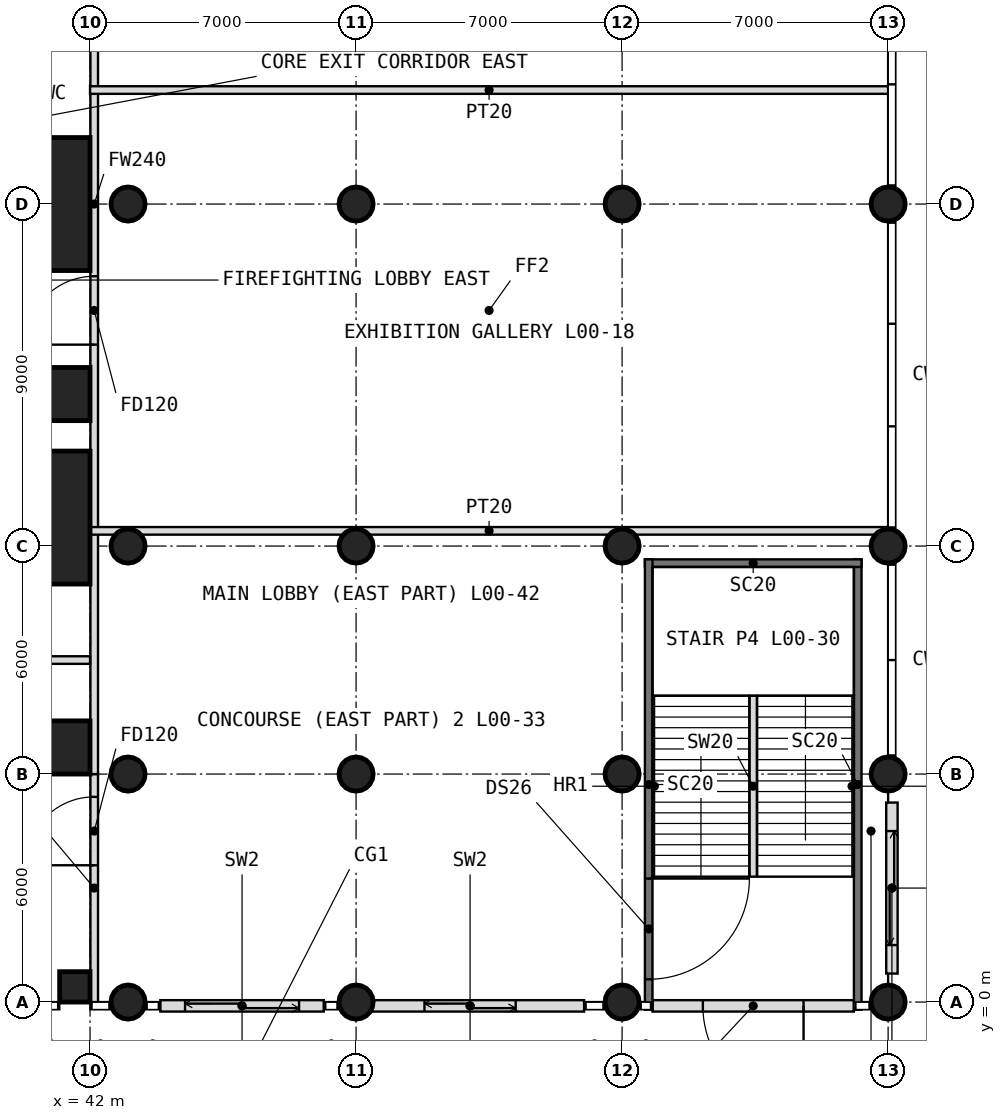
"""IFC4 building model, lengths in metres.
Left out: names, types, materials, properties, quantities, classifications, styles, units other than length and angle.
Written with IfcOpenShell. Run it as: python <this file> out.ifc"""

import sys

from ifc_helpers import new_model, si_unit, direction, frame, frame_2d, origin, origin_2d, place, context, subcontext, project, spatial, rectangle, circle, extrude, element, fill, save


model = new_model("IFC4")
c1 = context("Model", 3, precision=1e-05, world=origin(), true_north=direction((0.0, 1.0)))
c2 = subcontext(c1, "Body", "Model", "MODEL_VIEW")
j1 = project(units=[si_unit("LENGTHUNIT", "METRE"), si_unit("PLANEANGLEUNIT", "RADIAN")], contexts=[c1])
p1 = place(None, origin())
s1 = spatial("IfcSite", under=j1, at=p1, CompositionType="ELEMENT")
p2 = place(p1, origin())
s2 = spatial("IfcBuilding", under=s1, at=p2, CompositionType="ELEMENT")
p3 = place(p2, origin())
s3 = spatial("IfcBuildingStorey", under=s2, at=p3, CompositionType="ELEMENT", Elevation=0.0)
p4 = place(p3, frame((41.6, 0.4, -0.4), z_axis=(0.0, 0.0, 1.0), x_axis=(1.0, 0.0, 0.0)))
e1 = element("IfcColumn", 1, at=p4, inside=s3, PredefinedType="COLUMN", context=c2, shape_type="SweptSolid", body=[
    extrude(rectangle(XDim=0.8, YDim=0.8, at=origin_2d()), origin(), (0.0, 0.0, 1.0), 6.4),
])
for number, where, z_axis, x_axis in (
    (2, (43.0, 0.0, -0.4), (0.0, 0.0, 1.0), (1.0, 0.0, 0.0)),
    (3, (49.0, 0.0, -0.4), (0.0, 0.0, 1.0), (1.0, 0.0, 0.0)),
    (4, (56.0, 0.0, -0.4), (0.0, 0.0, 1.0), (1.0, 0.0, 0.0)),
    (5, (63.0, 0.0, -0.4), (0.0, 0.0, 1.0), (1.0, 0.0, 0.0)),
):
    element("IfcColumn", number, at=place(p3, frame(where, z_axis=z_axis, x_axis=x_axis)), inside=s3, PredefinedType="COLUMN", context=c2, shape_type="SweptSolid", body=[
        extrude(circle(Radius=0.45, at=origin_2d()), origin(), (0.0, 0.0, 1.0), 6.4),
    ])
p5 = place(p3, frame((41.3, 6.7, -0.4), z_axis=(0.0, 0.0, 1.0), x_axis=(1.0, 0.0, 0.0)))
e6 = element("IfcColumn", 6, at=p5, inside=s3, PredefinedType="COLUMN", context=c2, shape_type="SweptSolid", body=[
    extrude(rectangle(XDim=1.4, YDim=1.4, at=origin_2d()), origin(), (0.0, 0.0, 1.0), 6.4),
])
for number, where, z_axis, x_axis in (
    (7, (43.0, 6.0, -0.4), (0.0, 0.0, 1.0), (1.0, 0.0, 0.0)),
    (8, (49.0, 6.0, -0.4), (0.0, 0.0, 1.0), (1.0, 0.0, 0.0)),
    (9, (56.0, 6.0, -0.4), (0.0, 0.0, 1.0), (1.0, 0.0, 0.0)),
    (10, (63.0, 6.0, -0.4), (0.0, 0.0, 1.0), (1.0, 0.0, 0.0)),
):
    element("IfcColumn", number, at=place(p3, frame(where, z_axis=z_axis, x_axis=x_axis)), inside=s3, PredefinedType="COLUMN", context=c2, shape_type="SweptSolid", body=[
        extrude(circle(Radius=0.45, at=origin_2d()), origin(), (0.0, 0.0, 1.0), 6.4),
    ])
p6 = place(p3, frame((40.25, 12.75, -0.4), z_axis=(0.0, 0.0, 1.0), x_axis=(1.0, 0.0, 0.0)))
e11 = element("IfcColumn", 11, at=p6, inside=s3, PredefinedType="COLUMN", context=c2, shape_type="SweptSolid", body=[
    extrude(rectangle(XDim=3.5, YDim=3.5, at=origin_2d()), origin(), (0.0, 0.0, 1.0), 6.4),
])
for number, where, z_axis, x_axis in (
    (12, (43.0, 12.0, -0.4), (0.0, 0.0, 1.0), (1.0, 0.0, 0.0)),
    (13, (49.0, 12.0, -0.4), (0.0, 0.0, 1.0), (1.0, 0.0, 0.0)),
    (14, (56.0, 12.0, -0.4), (0.0, 0.0, 1.0), (1.0, 0.0, 0.0)),
    (15, (63.0, 12.0, -0.4), (0.0, 0.0, 1.0), (1.0, 0.0, 0.0)),
):
    element("IfcColumn", number, at=place(p3, frame(where, z_axis=z_axis, x_axis=x_axis)), inside=s3, PredefinedType="COLUMN", context=c2, shape_type="SweptSolid", body=[
        extrude(circle(Radius=0.45, at=origin_2d()), origin(), (0.0, 0.0, 1.0), 6.4),
    ])
p7 = place(p3, frame((41.3, 16.0, -0.4), z_axis=(0.0, 0.0, 1.0), x_axis=(1.0, 0.0, 0.0)))
e16 = element("IfcColumn", 16, at=p7, inside=s3, PredefinedType="COLUMN", context=c2, shape_type="SweptSolid", body=[
    extrude(rectangle(XDim=1.4, YDim=1.4, at=origin_2d()), origin(), (0.0, 0.0, 1.0), 6.4),
])
p8 = place(p3, frame((40.25, 21.0, -0.4), z_axis=(0.0, 0.0, 1.0), x_axis=(1.0, 0.0, 0.0)))
e17 = element("IfcColumn", 17, at=p8, inside=s3, PredefinedType="COLUMN", context=c2, shape_type="SweptSolid", body=[
    extrude(rectangle(XDim=3.5, YDim=3.5, at=origin_2d()), origin(), (0.0, 0.0, 1.0), 6.4),
])
for number, where, z_axis, x_axis in (
    (18, (43.0, 21.0, -0.4), (0.0, 0.0, 1.0), (1.0, 0.0, 0.0)),
    (19, (49.0, 21.0, -0.4), (0.0, 0.0, 1.0), (1.0, 0.0, 0.0)),
    (20, (56.0, 21.0, -0.4), (0.0, 0.0, 1.0), (1.0, 0.0, 0.0)),
    (21, (63.0, 21.0, -0.4), (0.0, 0.0, 1.0), (1.0, 0.0, 0.0)),
):
    element("IfcColumn", number, at=place(p3, frame(where, z_axis=z_axis, x_axis=x_axis)), inside=s3, PredefinedType="COLUMN", context=c2, shape_type="SweptSolid", body=[
        extrude(circle(Radius=0.45, at=origin_2d()), origin(), (0.0, 0.0, 1.0), 6.4),
    ])
p9 = place(p3, frame((43.85, -0.1, 0.0), z_axis=(0.0, 0.0, 1.0), x_axis=(1.0, 0.0, 0.0)))
e22 = element("IfcWall", 22, at=p9, inside=s3, PredefinedType="USERDEFINED", context=c2, shape_type="SweptSolid", body=[
    extrude(rectangle(XDim=4.3, YDim=0.3, at=frame_2d((2.15, 0.0))), origin(), (0.0, 0.0, 1.0), 4.6),
])
p10 = place(p9, frame((0.65, 0.0, 0.0)))
e23 = element("IfcOpeningElement", 23, at=p10, cuts=e22, PredefinedType="OPENING", context=c2, shape_type="SweptSolid", body=[
    extrude(rectangle(XDim=3.0, YDim=3.0, at=frame_2d((1.5, 1.5))), frame((0.0, 0.16, 0.0), z_axis=(0.0, -1.0, 0.0), x_axis=(1.0, 0.0, 0.0)), (0.0, 0.0, 1.0), 0.32),
])
p11 = place(p3, frame((49.0, -0.1, 0.0), z_axis=(0.0, 0.0, 1.0), x_axis=(1.0, 0.0, 0.0)))
e24 = element("IfcWall", 24, at=p11, inside=s3, PredefinedType="USERDEFINED", context=c2, shape_type="SweptSolid", body=[
    extrude(rectangle(XDim=6.0, YDim=0.3, at=frame_2d((3.0, 0.0))), origin(), (0.0, 0.0, 1.0), 4.6),
])
p12 = place(p11, frame((1.8, 0.0, 0.0)))
e25 = element("IfcOpeningElement", 25, at=p12, cuts=e24, PredefinedType="OPENING", context=c2, shape_type="SweptSolid", body=[
    extrude(rectangle(XDim=2.4, YDim=3.0, at=frame_2d((1.2, 1.5))), frame((0.0, 0.16, 0.0), z_axis=(0.0, -1.0, 0.0), x_axis=(1.0, 0.0, 0.0)), (0.0, 0.0, 1.0), 0.32),
])
p13 = place(p3, frame((62.1, -0.1, 0.0), z_axis=(0.0, 0.0, 1.0), x_axis=(-1.0, 0.0, 0.0)))
e26 = element("IfcWall", 26, at=p13, inside=s3, PredefinedType="USERDEFINED", context=c2, shape_type="SweptSolid", body=[
    extrude(rectangle(XDim=5.3, YDim=0.3, at=frame_2d((2.65, 0.0))), origin(), (0.0, 0.0, 1.0), 4.6),
])
p14 = place(p13, frame((1.325, 0.0, 0.0)))
e27 = element("IfcOpeningElement", 27, at=p14, cuts=e26, PredefinedType="OPENING", context=c2, shape_type="SweptSolid", body=[
    extrude(rectangle(XDim=2.65, YDim=2.4, at=frame_2d((1.325, 1.2))), frame((0.0, 0.16, 0.0), z_axis=(0.0, -1.0, 0.0), x_axis=(1.0, 0.0, 0.0)), (0.0, 0.0, 1.0), 0.32),
])
p15 = place(p3, frame((63.1, 0.75, 0.0), z_axis=(0.0, 0.0, 1.0), x_axis=(0.0, 1.0, 0.0)))
e28 = element("IfcWall", 28, at=p15, inside=s3, PredefinedType="USERDEFINED", context=c2, shape_type="SweptSolid", body=[
    extrude(rectangle(XDim=4.5, YDim=0.3, at=frame_2d((2.25, 0.0))), origin(), (0.0, 0.0, 1.0), 4.6),
])
p16 = place(p15, frame((0.75, 0.0, 0.0)))
e29 = element("IfcOpeningElement", 29, at=p16, cuts=e28, PredefinedType="OPENING", context=c2, shape_type="SweptSolid", body=[
    extrude(rectangle(XDim=3.0, YDim=3.0, at=frame_2d((1.5, 1.5))), frame((0.0, 0.16, 0.0), z_axis=(0.0, -1.0, 0.0), x_axis=(1.0, 0.0, 0.0)), (0.0, 0.0, 1.0), 0.32),
])
p17 = place(p3, frame((62.2, -0.2, 0.0), z_axis=(0.0, 0.0, 1.0), x_axis=(0.0, 1.0, 0.0)))
e30 = element("IfcWall", 30, at=p17, inside=s3, PredefinedType="SOLIDWALL", context=c2, shape_type="SweptSolid", body=[
    extrude(rectangle(XDim=11.85, YDim=0.2, at=frame_2d((5.925, 0.0))), origin(), (0.0, 0.0, 1.0), 5.8),
])
p18 = place(p3, frame((62.3, 11.55, 0.0), z_axis=(0.0, 0.0, 1.0), x_axis=(-1.0, 0.0, 0.0)))
e31 = element("IfcWall", 31, at=p18, inside=s3, PredefinedType="SOLIDWALL", context=c2, shape_type="SweptSolid", body=[
    extrude(rectangle(XDim=5.7, YDim=0.2, at=frame_2d((2.85, 0.0))), origin(), (0.0, 0.0, 1.0), 5.8),
])
p19 = place(p3, frame((56.7, 11.65, 0.0), z_axis=(0.0, 0.0, 1.0), x_axis=(0.0, -1.0, 0.0)))
e32 = element("IfcWall", 32, at=p19, inside=s3, PredefinedType="SOLIDWALL", context=c2, shape_type="SweptSolid", body=[
    extrude(rectangle(XDim=11.85, YDim=0.2, at=frame_2d((5.925, 0.0))), origin(), (0.0, 0.0, 1.0), 5.8),
])
p20 = place(p19, frame((8.4, 0.0, 0.0)))
e33 = element("IfcOpeningElement", 33, at=p20, cuts=e32, PredefinedType="OPENING", context=c2, shape_type="SweptSolid", body=[
    extrude(rectangle(XDim=2.65, YDim=2.4, at=frame_2d((1.325, 1.2))), frame((0.0, 0.11, 0.0), z_axis=(0.0, -1.0, 0.0), x_axis=(1.0, 0.0, 0.0)), (0.0, 0.0, 1.0), 0.22),
])
p21 = place(p3, frame((42.11, 0.0, 0.0), z_axis=(0.0, 0.0, 1.0), x_axis=(0.0, 1.0, 0.0)))
e34 = element("IfcWall", 34, at=p21, inside=s3, PredefinedType="PARTITIONING", context=c2, shape_type="SweptSolid", body=[
    extrude(rectangle(XDim=6.0, YDim=0.2, at=frame_2d((3.0, 0.0))), origin(), (0.0, 0.0, 1.0), 4.98),
])
p22 = place(p21, frame((3.6, 0.0, 0.0)))
e35 = element("IfcOpeningElement", 35, at=p22, cuts=e34, PredefinedType="OPENING", context=c2, shape_type="SweptSolid", body=[
    extrude(rectangle(XDim=1.8, YDim=2.4, at=frame_2d((0.9, 1.2))), frame((0.0, 0.11, 0.0), z_axis=(0.0, -1.0, 0.0), x_axis=(1.0, 0.0, 0.0)), (0.0, 0.0, 1.0), 0.22),
])
p23 = place(p3, frame((42.11, 6.0, 0.0), z_axis=(0.0, 0.0, 1.0), x_axis=(0.0, 1.0, 0.0)))
e36 = element("IfcWall", 36, at=p23, inside=s3, PredefinedType="PARTITIONING", context=c2, shape_type="SweptSolid", body=[
    extrude(rectangle(XDim=30.0, YDim=0.2, at=frame_2d((15.0, 0.0))), origin(), (0.0, 0.0, 1.0), 5.6),
])
p24 = place(p23, frame((11.3, 0.0, 0.0)))
e37 = element("IfcOpeningElement", 37, at=p24, cuts=e36, PredefinedType="OPENING", context=c2, shape_type="SweptSolid", body=[
    extrude(rectangle(XDim=1.8, YDim=2.4, at=frame_2d((0.9, 1.2))), frame((0.0, 0.11, 0.0), z_axis=(0.0, -1.0, 0.0), x_axis=(1.0, 0.0, 0.0)), (0.0, 0.0, 1.0), 0.22),
])
p25 = place(p23, frame((26.1, 0.0, 0.0)))
e38 = element("IfcOpeningElement", 38, at=p25, cuts=e36, PredefinedType="OPENING", context=c2, shape_type="SweptSolid", body=[
    extrude(rectangle(XDim=1.8, YDim=2.4, at=frame_2d((0.9, 1.2))), frame((0.0, 0.11, 0.0), z_axis=(0.0, -1.0, 0.0), x_axis=(1.0, 0.0, 0.0)), (0.0, 0.0, 1.0), 0.22),
])
p26 = place(p3, frame((0.0, 9.0, 0.0), z_axis=(0.0, 0.0, 1.0), x_axis=(1.0, 0.0, 0.0)))
e39 = element("IfcWall", 39, at=p26, inside=s3, PredefinedType="PARTITIONING", context=c2, shape_type="SweptSolid", body=[
    extrude(rectangle(XDim=42.0, YDim=0.2, at=frame_2d((21.0, 0.0))), origin(), (0.0, 0.0, 1.0), 5.6),
])
p27 = place(p26, frame((11.0, 0.0, 0.0)))
e40 = element("IfcOpeningElement", 40, at=p27, cuts=e39, PredefinedType="OPENING", context=c2, shape_type="SweptSolid", body=[
    extrude(rectangle(XDim=2.0, YDim=2.2, at=frame_2d((1.0, 1.1))), frame((0.0, 0.11, 0.0), z_axis=(0.0, -1.0, 0.0), x_axis=(1.0, 0.0, 0.0)), (0.0, 0.0, 1.0), 0.22),
])
p28 = place(p26, frame((32.0, 0.0, 0.0)))
e41 = element("IfcOpeningElement", 41, at=p28, cuts=e39, PredefinedType="OPENING", context=c2, shape_type="SweptSolid", body=[
    extrude(rectangle(XDim=2.0, YDim=2.2, at=frame_2d((1.0, 1.1))), frame((0.0, 0.11, 0.0), z_axis=(0.0, -1.0, 0.0), x_axis=(1.0, 0.0, 0.0)), (0.0, 0.0, 1.0), 0.22),
])
for number, where, z_axis, x_axis in (
    (42, (42.0, 12.4, 0.0), (0.0, 0.0, 1.0), (1.0, 0.0, 0.0)),
    (43, (42.0, 24.0, 0.0), (0.0, 0.0, 1.0), (1.0, 0.0, 0.0)),
):
    element("IfcWall", number, at=place(p3, frame(where, z_axis=z_axis, x_axis=x_axis)), inside=s3, PredefinedType="PARTITIONING", context=c2, shape_type="SweptSolid", body=[
        extrude(rectangle(XDim=21.0, YDim=0.2, at=frame_2d((10.5, 0.0))), origin(), (0.0, 0.0, 1.0), 5.6),
    ])
p29 = place(p3, frame((59.45, 3.3, 0.0), z_axis=(0.0, 0.0, 1.0), x_axis=(0.0, 1.0, 0.0)))
e44 = element("IfcWall", 44, at=p29, inside=s3, PredefinedType="PARTITIONING", context=c2, shape_type="SweptSolid", body=[
    extrude(rectangle(XDim=4.76, YDim=0.2, at=frame_2d((2.38, 0.0))), origin(), (0.0, 0.0, 1.0), 6.0),
])
p30 = place(p10, origin())
e45 = element("IfcDoor", 45, at=p30, inside=s3, OperationType="DOUBLE_DOOR_SLIDING", PredefinedType="DOOR", context=c2, shape_type="SweptSolid", body=[
    extrude(rectangle(XDim=3.0, YDim=3.0, at=frame_2d((1.5, 1.5))), frame((0.0, 0.025, 0.0), z_axis=(0.0, -1.0, 0.0), x_axis=(1.0, 0.0, 0.0)), (0.0, 0.0, 1.0), 0.05),
])
fill(e23, e45)
p31 = place(p12, origin())
e46 = element("IfcDoor", 46, at=p31, inside=s3, OperationType="DOUBLE_DOOR_SLIDING", PredefinedType="DOOR", context=c2, shape_type="SweptSolid", body=[
    extrude(rectangle(XDim=2.4, YDim=3.0, at=frame_2d((1.2, 1.5))), frame((0.0, 0.025, 0.0), z_axis=(0.0, -1.0, 0.0), x_axis=(1.0, 0.0, 0.0)), (0.0, 0.0, 1.0), 0.05),
])
fill(e25, e46)
p32 = place(p14, origin())
e47 = element("IfcDoor", 47, at=p32, inside=s3, OperationType="DOUBLE_DOOR_SINGLE_SWING", PredefinedType="DOOR", context=c2, shape_type="SweptSolid", body=[
    extrude(rectangle(XDim=2.65, YDim=2.4, at=frame_2d((1.325, 1.2))), frame((0.0, 0.025, 0.0), z_axis=(0.0, -1.0, 0.0), x_axis=(1.0, 0.0, 0.0)), (0.0, 0.0, 1.0), 0.05),
])
fill(e27, e47)
p33 = place(p16, origin())
e48 = element("IfcDoor", 48, at=p33, inside=s3, OperationType="DOUBLE_DOOR_SLIDING", PredefinedType="DOOR", context=c2, shape_type="SweptSolid", body=[
    extrude(rectangle(XDim=3.0, YDim=3.0, at=frame_2d((1.5, 1.5))), frame((0.0, 0.025, 0.0), z_axis=(0.0, -1.0, 0.0), x_axis=(1.0, 0.0, 0.0)), (0.0, 0.0, 1.0), 0.05),
])
fill(e29, e48)
p34 = place(p20, origin())
e49 = element("IfcDoor", 49, at=p34, inside=s3, OperationType="DOUBLE_DOOR_SINGLE_SWING", PredefinedType="DOOR", context=c2, shape_type="SweptSolid", body=[
    extrude(rectangle(XDim=2.65, YDim=2.4, at=frame_2d((1.325, 1.2))), frame((0.0, 0.025, 0.0), z_axis=(0.0, -1.0, 0.0), x_axis=(1.0, 0.0, 0.0)), (0.0, 0.0, 1.0), 0.05),
])
fill(e33, e49)
p35 = place(p22, origin())
e50 = element("IfcDoor", 50, at=p35, inside=s3, OperationType="DOUBLE_DOOR_SINGLE_SWING", PredefinedType="DOOR", context=c2, shape_type="SweptSolid", body=[
    extrude(rectangle(XDim=1.8, YDim=2.4, at=frame_2d((0.9, 1.2))), frame((0.0, 0.025, 0.0), z_axis=(0.0, -1.0, 0.0), x_axis=(1.0, 0.0, 0.0)), (0.0, 0.0, 1.0), 0.05),
])
fill(e35, e50)
p36 = place(p24, origin())
e51 = element("IfcDoor", 51, at=p36, inside=s3, OperationType="DOUBLE_DOOR_SINGLE_SWING", PredefinedType="DOOR", context=c2, shape_type="SweptSolid", body=[
    extrude(rectangle(XDim=1.8, YDim=2.4, at=frame_2d((0.9, 1.2))), frame((0.0, 0.025, 0.0), z_axis=(0.0, -1.0, 0.0), x_axis=(1.0, 0.0, 0.0)), (0.0, 0.0, 1.0), 0.05),
])
fill(e37, e51)
save(model, sys.argv[1])
